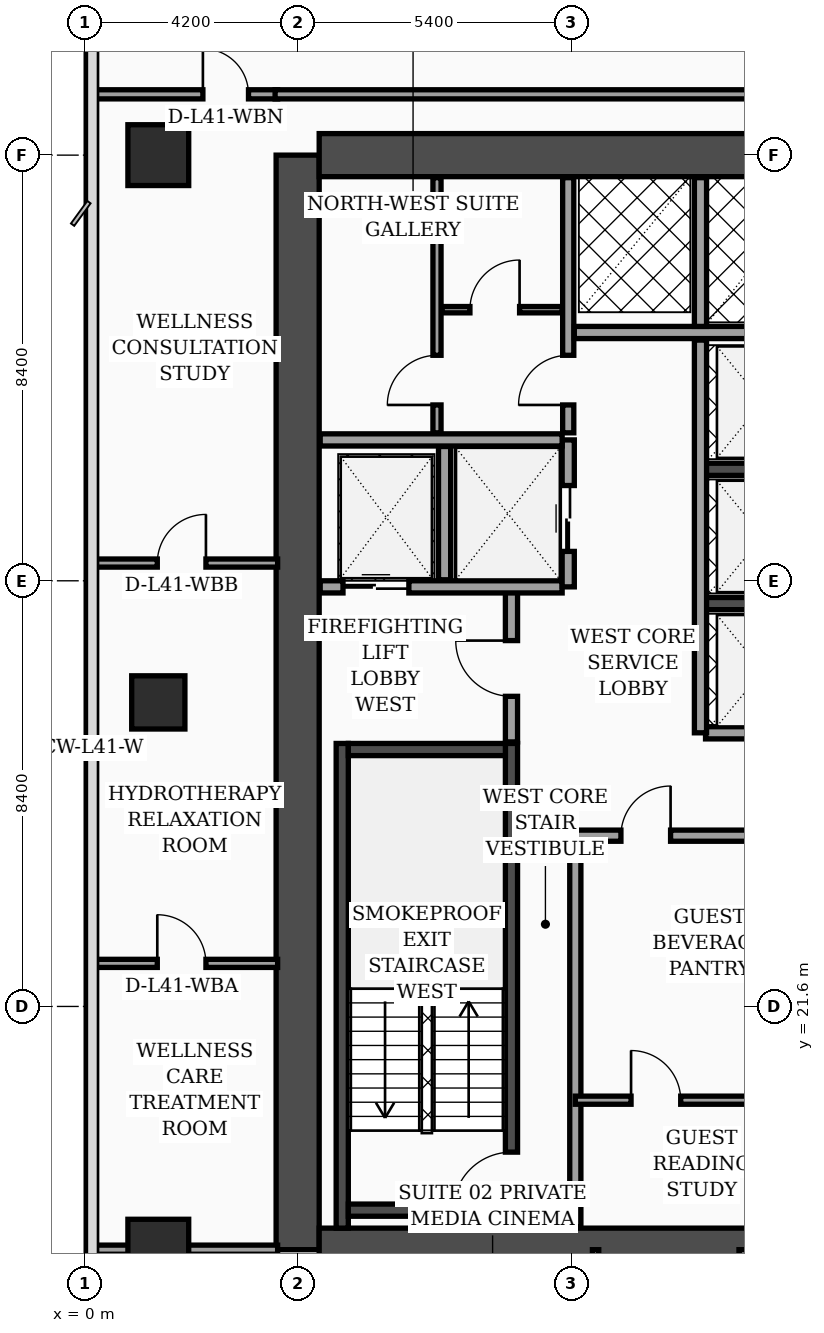
"""IFC4 building model, lengths in metres.
Left out: names, types, materials, properties, quantities, classifications, styles, units other than length and angle.
Written with IfcOpenShell. Run it as: python <this file> out.ifc"""

import sys

from ifc_helpers import new_model, si_unit, direction, frame, frame_2d, origin, origin_2d, place, context, subcontext, project, spatial, rectangle, extrude, element, fill, save


model = new_model("IFC4")
c1 = context("Model", 3, precision=1e-05, world=origin(), true_north=direction((0.0, 1.0)))
c2 = subcontext(c1, "Body", "Model", "MODEL_VIEW")
j1 = project(units=[si_unit("LENGTHUNIT", "METRE"), si_unit("PLANEANGLEUNIT", "RADIAN")], contexts=[c1])
p1 = place(None, origin())
s1 = spatial("IfcSite", under=j1, at=p1, CompositionType="ELEMENT")
p2 = place(p1, origin())
s2 = spatial("IfcBuilding", under=s1, at=p2, CompositionType="ELEMENT")
p3 = place(p2, frame((0.0, 0.0, 167.5)))
s3 = spatial("IfcBuildingStorey", under=s2, at=p3, CompositionType="ELEMENT", Elevation=167.5)
p4 = place(p3, frame((4.2, 16.8, 0.0), z_axis=(0.0, 0.0, 1.0), x_axis=(0.0, 1.0, 0.0)))
e1 = element("IfcWall", 1, at=p4, inside=s3, PredefinedType="SHEAR", context=c2, shape_type="SweptSolid", body=[
    extrude(rectangle(XDim=21.6, YDim=0.85, at=frame_2d((10.8, 0.0))), origin(), (0.0, 0.0, 1.0), 3.56),
])
for number, where, z_axis, x_axis in (
    (2, (4.625, 38.4, 0.0), (0.0, 0.0, 1.0), (1.0, 0.0, 0.0)),
    (3, (4.625, 16.8, 0.0), (0.0, 0.0, 1.0), (1.0, 0.0, 0.0)),
):
    element("IfcWall", number, at=place(p3, frame(where, z_axis=z_axis, x_axis=x_axis)), inside=s3, PredefinedType="SHEAR", context=c2, shape_type="SweptSolid", body=[
        extrude(rectangle(XDim=9.95, YDim=0.85, at=frame_2d((4.975, 0.0))), origin(), (0.0, 0.0, 1.0), 3.56),
    ])
p5 = place(p3, frame((5.08, 17.225, 0.0), z_axis=(0.0, 0.0, 1.0), x_axis=(0.0, 1.0, 0.0)))
e4 = element("IfcWall", 4, at=p5, inside=s3, PredefinedType="SOLIDWALL", context=c2, shape_type="SweptSolid", body=[
    extrude(rectangle(XDim=9.565, YDim=0.24, at=frame_2d((4.782, 0.0))), origin(), (0.0, 0.0, 1.0), 3.56),
])
p6 = place(p3, frame((8.42, 17.225, 0.0), z_axis=(0.0, 0.0, 1.0), x_axis=(0.0, 1.0, 0.0)))
e5 = element("IfcWall", 5, at=p6, inside=s3, PredefinedType="SOLIDWALL", context=c2, shape_type="SweptSolid", body=[
    extrude(rectangle(XDim=9.565, YDim=0.24, at=frame_2d((4.782, 0.0))), origin(), (0.0, 0.0, 1.0), 3.56),
])
p7 = place(p6, frame((0.35, 0.0, 0.0)))
e6 = element("IfcOpeningElement", 6, at=p7, cuts=e5, PredefinedType="OPENING", context=c2, shape_type="SweptSolid", body=[
    extrude(rectangle(XDim=1.15, YDim=2.2, at=frame_2d((0.575, 1.1))), frame((0.0, 0.13, 0.0), z_axis=(0.0, -1.0, 0.0), x_axis=(1.0, 0.0, 0.0)), (0.0, 0.0, 1.0), 0.26),
])
for number, where, z_axis, x_axis in (
    (7, (5.2, 17.58, 0.0), (0.0, 0.0, 1.0), (1.0, 0.0, 0.0)),
    (8, (5.2, 26.67, 0.0), (0.0, 0.0, 1.0), (1.0, 0.0, 0.0)),
):
    element("IfcWall", number, at=place(p3, frame(where, z_axis=z_axis, x_axis=x_axis)), inside=s3, PredefinedType="SOLIDWALL", context=c2, shape_type="SweptSolid", body=[
        extrude(rectangle(XDim=3.1, YDim=0.24, at=frame_2d((1.55, 0.0))), origin(), (0.0, 0.0, 1.0), 3.56),
    ])
for number, where, z_axis, x_axis in (
    (9, (12.18, 29.55, 0.0), (0.0, 0.0, 1.0), (1.0, 0.0, 0.0)),
    (10, (12.18, 32.2, 0.0), (0.0, 0.0, 1.0), (1.0, 0.0, 0.0)),
):
    element("IfcWall", number, at=place(p3, frame(where, z_axis=z_axis, x_axis=x_axis)), inside=s3, PredefinedType="SOLIDWALL", context=c2, shape_type="SweptSolid", body=[
        extrude(rectangle(XDim=2.395, YDim=0.24, at=frame_2d((1.198, 0.0))), origin(), (0.0, 0.0, 1.0), 3.56),
    ])
p8 = place(p3, frame((1.45, 16.8, 0.0), z_axis=(0.0, 0.0, 1.0), x_axis=(1.0, 0.0, 0.0)))
e11 = element("IfcColumn", 11, at=p8, inside=s3, PredefinedType="COLUMN", context=c2, shape_type="SweptSolid", body=[
    extrude(rectangle(XDim=1.2, YDim=1.2, at=origin_2d()), origin(), (0.0, 0.0, 1.0), 3.56),
])
p9 = place(p3, frame((1.45, 27.6, 0.0), z_axis=(0.0, 0.0, 1.0), x_axis=(1.0, 0.0, 0.0)))
e12 = element("IfcColumn", 12, at=p9, inside=s3, PredefinedType="COLUMN", context=c2, shape_type="SweptSolid", body=[
    extrude(rectangle(XDim=1.05, YDim=1.05, at=origin_2d()), origin(), (0.0, 0.0, 1.0), 3.56),
])
p10 = place(p3, frame((1.45, 38.4, 0.0), z_axis=(0.0, 0.0, 1.0), x_axis=(1.0, 0.0, 0.0)))
e13 = element("IfcColumn", 13, at=p10, inside=s3, PredefinedType="COLUMN", context=c2, shape_type="SweptSolid", body=[
    extrude(rectangle(XDim=1.2, YDim=1.2, at=origin_2d()), origin(), (0.0, 0.0, 1.0), 3.56),
])
p11 = place(p3, frame((8.42, 26.82, 0.0), z_axis=(0.0, 0.0, 1.0), x_axis=(0.0, 1.0, 0.0)))
e14 = element("IfcWall", 14, at=p11, inside=s3, PredefinedType="SOLIDWALL", context=c2, shape_type="SweptSolid", body=[
    extrude(rectangle(XDim=3.0, YDim=0.24, at=frame_2d((1.5, 0.0))), origin(), (0.0, 0.0, 1.0), 3.56),
])
p12 = place(p11, frame((0.9, 0.0, 0.0)))
e15 = element("IfcOpeningElement", 15, at=p12, cuts=e14, PredefinedType="OPENING", context=c2, shape_type="SweptSolid", body=[
    extrude(rectangle(XDim=1.1, YDim=2.2, at=frame_2d((0.55, 1.1))), frame((0.0, 0.13, 0.0), z_axis=(0.0, -1.0, 0.0), x_axis=(1.0, 0.0, 0.0)), (0.0, 0.0, 1.0), 0.26),
])
p13 = place(p3, frame((4.645, 29.88, 0.0), z_axis=(0.0, 0.0, 1.0), x_axis=(1.0, 0.0, 0.0)))
e16 = element("IfcWall", 16, at=p13, inside=s3, PredefinedType="SOLIDWALL", context=c2, shape_type="SweptSolid", body=[
    extrude(rectangle(XDim=4.775, YDim=0.24, at=frame_2d((2.387, 0.0))), origin(), (0.0, 0.0, 1.0), 3.56),
])
p14 = place(p13, frame((0.45, 0.0, 0.0)))
e17 = element("IfcOpeningElement", 17, at=p14, cuts=e16, PredefinedType="OPENING", context=c2, shape_type="SweptSolid", body=[
    extrude(rectangle(XDim=1.3, YDim=2.35, at=frame_2d((0.65, 1.175))), frame((0.0, 0.13, 0.0), z_axis=(0.0, -1.0, 0.0), x_axis=(1.0, 0.0, 0.0)), (0.0, 0.0, 1.0), 0.26),
])
p15 = place(p3, frame((7.1, 30.02, 0.0), z_axis=(0.0, 0.0, 1.0), x_axis=(0.0, 1.0, 0.0)))
e18 = element("IfcWall", 18, at=p15, inside=s3, PredefinedType="SOLIDWALL", context=c2, shape_type="SweptSolid", body=[
    extrude(rectangle(XDim=2.63, YDim=0.24, at=frame_2d((1.315, 0.0))), origin(), (0.0, 0.0, 1.0), 3.56),
])
p16 = place(p3, frame((9.54, 29.88, 0.0), z_axis=(0.0, 0.0, 1.0), x_axis=(0.0, 1.0, 0.0)))
e19 = element("IfcWall", 19, at=p16, inside=s3, PredefinedType="SOLIDWALL", context=c2, shape_type="SweptSolid", body=[
    extrude(rectangle(XDim=2.9, YDim=0.24, at=frame_2d((1.45, 0.0))), origin(), (0.0, 0.0, 1.0), 3.56),
])
p17 = place(p16, frame((0.7, 0.0, 0.0)))
e20 = element("IfcOpeningElement", 20, at=p17, cuts=e19, PredefinedType="OPENING", context=c2, shape_type="SweptSolid", body=[
    extrude(rectangle(XDim=1.3, YDim=2.35, at=frame_2d((0.65, 1.175))), frame((0.0, 0.13, 0.0), z_axis=(0.0, -1.0, 0.0), x_axis=(1.0, 0.0, 0.0)), (0.0, 0.0, 1.0), 0.26),
])
p18 = place(p3, frame((4.645, 32.78, 0.0), z_axis=(0.0, 0.0, 1.0), x_axis=(1.0, 0.0, 0.0)))
e21 = element("IfcWall", 21, at=p18, inside=s3, PredefinedType="SOLIDWALL", context=c2, shape_type="SweptSolid", body=[
    extrude(rectangle(XDim=4.775, YDim=0.24, at=frame_2d((2.387, 0.0))), origin(), (0.0, 0.0, 1.0), 3.19),
])
p19 = place(p3, frame((9.68, 17.245, 0.0), z_axis=(0.0, 0.0, 1.0), x_axis=(0.0, 1.0, 0.0)))
e22 = element("IfcWall", 22, at=p19, inside=s3, PredefinedType="SOLIDWALL", context=c2, shape_type="SweptSolid", body=[
    extrude(rectangle(XDim=7.755, YDim=0.22, at=frame_2d((3.877, 0.0))), origin(), (0.0, 0.0, 1.0), 3.56),
])
p20 = place(p3, frame((6.95, 32.92, 0.0), z_axis=(0.0, 0.0, 1.0), x_axis=(0.0, 1.0, 0.0)))
e23 = element("IfcWall", 23, at=p20, inside=s3, PredefinedType="PARTITIONING", context=c2, shape_type="SweptSolid", body=[
    extrude(rectangle(XDim=5.035, YDim=0.16, at=frame_2d((2.518, 0.0))), origin(), (0.0, 0.0, 1.0), 3.56),
])
p21 = place(p20, frame((0.55, 0.0, 0.0)))
e24 = element("IfcOpeningElement", 24, at=p21, cuts=e23, PredefinedType="OPENING", context=c2, shape_type="SweptSolid", body=[
    extrude(rectangle(XDim=0.98, YDim=2.15, at=frame_2d((0.49, 1.075))), frame((0.0, 0.09, 0.0), z_axis=(0.0, -1.0, 0.0), x_axis=(1.0, 0.0, 0.0)), (0.0, 0.0, 1.0), 0.18),
])
p22 = place(p3, frame((7.05, 35.35, 0.0), z_axis=(0.0, 0.0, 1.0), x_axis=(1.0, 0.0, 0.0)))
e25 = element("IfcWall", 25, at=p22, inside=s3, PredefinedType="PARTITIONING", context=c2, shape_type="SweptSolid", body=[
    extrude(rectangle(XDim=2.37, YDim=0.125, at=frame_2d((1.185, 0.0))), origin(), (0.0, 0.0, 1.0), 3.56),
])
p23 = place(p22, frame((0.55, 0.0, 0.0)))
e26 = element("IfcOpeningElement", 26, at=p23, cuts=e25, PredefinedType="OPENING", context=c2, shape_type="SweptSolid", body=[
    extrude(rectangle(XDim=0.98, YDim=2.15, at=frame_2d((0.49, 1.075))), frame((0.0, 0.073, 0.0), z_axis=(0.0, -1.0, 0.0), x_axis=(1.0, 0.0, 0.0)), (0.0, 0.0, 1.0), 0.145),
])
p24 = place(p3, frame((9.54, 32.92, 0.0), z_axis=(0.0, 0.0, 1.0), x_axis=(0.0, 1.0, 0.0)))
e27 = element("IfcWall", 27, at=p24, inside=s3, PredefinedType="SOLIDWALL", context=c2, shape_type="SweptSolid", body=[
    extrude(rectangle(XDim=5.035, YDim=0.22, at=frame_2d((2.518, 0.0))), origin(), (0.0, 0.0, 1.0), 3.56),
])
p25 = place(p24, frame((0.55, 0.0, 0.0)))
e28 = element("IfcOpeningElement", 28, at=p25, cuts=e27, PredefinedType="OPENING", context=c2, shape_type="SweptSolid", body=[
    extrude(rectangle(XDim=0.98, YDim=2.15, at=frame_2d((0.49, 1.075))), frame((0.0, 0.12, 0.0), z_axis=(0.0, -1.0, 0.0), x_axis=(1.0, 0.0, 0.0)), (0.0, 0.0, 1.0), 0.24),
])
p26 = place(p3, frame((9.68, 19.75, 0.0), z_axis=(0.0, 0.0, 1.0), x_axis=(1.0, 0.0, 0.0)))
e29 = element("IfcWall", 29, at=p26, inside=s3, PredefinedType="PARTITIONING", context=c2, shape_type="SweptSolid", body=[
    extrude(rectangle(XDim=4.875, YDim=0.16, at=frame_2d((2.438, 0.0))), origin(), (0.0, 0.0, 1.0), 3.56),
])
p27 = place(p26, frame((1.1, 0.0, 0.0)))
e30 = element("IfcOpeningElement", 30, at=p27, cuts=e29, PredefinedType="OPENING", context=c2, shape_type="SweptSolid", body=[
    extrude(rectangle(XDim=0.98, YDim=2.15, at=frame_2d((0.49, 1.075))), frame((0.0, 0.09, 0.0), z_axis=(0.0, -1.0, 0.0), x_axis=(1.0, 0.0, 0.0)), (0.0, 0.0, 1.0), 0.18),
])
p28 = place(p3, frame((9.68, 24.97, 0.0), z_axis=(0.0, 0.0, 1.0), x_axis=(1.0, 0.0, 0.0)))
e31 = element("IfcWall", 31, at=p28, inside=s3, PredefinedType="SOLIDWALL", context=c2, shape_type="SweptSolid", body=[
    extrude(rectangle(XDim=4.875, YDim=0.22, at=frame_2d((2.438, 0.0))), origin(), (0.0, 0.0, 1.0), 2.94),
])
p29 = place(p28, frame((0.9, 0.0, 0.0)))
e32 = element("IfcOpeningElement", 32, at=p29, cuts=e31, PredefinedType="OPENING", context=c2, shape_type="SweptSolid", body=[
    extrude(rectangle(XDim=0.98, YDim=2.15, at=frame_2d((0.49, 1.075))), frame((0.0, 0.12, 0.0), z_axis=(0.0, -1.0, 0.0), x_axis=(1.0, 0.0, 0.0)), (0.0, 0.0, 1.0), 0.24),
])
p30 = place(p3, frame((12.25, 27.0, 0.0), z_axis=(0.0, 0.0, 1.0), x_axis=(1.0, 0.0, 0.0)))
e33 = element("IfcWall", 33, at=p30, inside=s3, PredefinedType="SOLIDWALL", context=c2, shape_type="SweptSolid", body=[
    extrude(rectangle(XDim=2.305, YDim=0.24, at=frame_2d((1.152, 0.0))), origin(), (0.0, 0.0, 1.0), 3.56),
])
p31 = place(p3, frame((12.15, 27.0, 0.0), z_axis=(0.0, 0.0, 1.0), x_axis=(0.0, 1.0, 0.0)))
e34 = element("IfcWall", 34, at=p31, inside=s3, PredefinedType="SOLIDWALL", context=c2, shape_type="SweptSolid", body=[
    extrude(rectangle(XDim=7.75, YDim=0.24, at=frame_2d((3.875, 0.0))), origin(), (0.0, 0.0, 1.0), 3.56),
])
p32 = place(p3, frame((9.66, 34.9, 0.0), z_axis=(0.0, 0.0, 1.0), x_axis=(1.0, 0.0, 0.0)))
e35 = element("IfcWall", 35, at=p32, inside=s3, PredefinedType="SOLIDWALL", context=c2, shape_type="SweptSolid", body=[
    extrude(rectangle(XDim=4.895, YDim=0.24, at=frame_2d((2.448, 0.0))), origin(), (0.0, 0.0, 1.0), 3.56),
])
p33 = place(p3, frame((12.15, 35.02, 0.0), z_axis=(0.0, 0.0, 1.0), x_axis=(0.0, 1.0, 0.0)))
e36 = element("IfcWall", 36, at=p33, inside=s3, PredefinedType="SOLIDWALL", context=c2, shape_type="SweptSolid", body=[
    extrude(rectangle(XDim=2.935, YDim=0.24, at=frame_2d((1.468, 0.0))), origin(), (0.0, 0.0, 1.0), 3.56),
])
p34 = place(p3, frame((0.08, 22.45, 0.0), z_axis=(0.0, 0.0, 1.0), x_axis=(1.0, 0.0, 0.0)))
e37 = element("IfcWall", 37, at=p34, inside=s3, PredefinedType="PARTITIONING", context=c2, shape_type="SweptSolid", body=[
    extrude(rectangle(XDim=3.725, YDim=0.16, at=frame_2d((1.862, 0.0))), origin(), (0.0, 0.0, 1.0), 3.04),
])
p35 = place(p34, frame((1.35, 0.0, 0.0)))
e38 = element("IfcOpeningElement", 38, at=p35, cuts=e37, PredefinedType="OPENING", context=c2, shape_type="SweptSolid", body=[
    extrude(rectangle(XDim=0.96, YDim=2.2, at=frame_2d((0.48, 1.1))), frame((0.0, 0.09, 0.0), z_axis=(0.0, -1.0, 0.0), x_axis=(1.0, 0.0, 0.0)), (0.0, 0.0, 1.0), 0.18),
])
p36 = place(p3, frame((0.08, 30.35, 0.0), z_axis=(0.0, 0.0, 1.0), x_axis=(1.0, 0.0, 0.0)))
e39 = element("IfcWall", 39, at=p36, inside=s3, PredefinedType="PARTITIONING", context=c2, shape_type="SweptSolid", body=[
    extrude(rectangle(XDim=3.725, YDim=0.16, at=frame_2d((1.862, 0.0))), origin(), (0.0, 0.0, 1.0), 3.04),
])
p37 = place(p36, frame((1.35, 0.0, 0.0)))
e40 = element("IfcOpeningElement", 40, at=p37, cuts=e39, PredefinedType="OPENING", context=c2, shape_type="SweptSolid", body=[
    extrude(rectangle(XDim=0.96, YDim=2.2, at=frame_2d((0.48, 1.1))), frame((0.0, 0.09, 0.0), z_axis=(0.0, -1.0, 0.0), x_axis=(1.0, 0.0, 0.0)), (0.0, 0.0, 1.0), 0.18),
])
p38 = place(p3, frame((0.08, 16.8, 0.0), z_axis=(0.0, 0.0, 1.0), x_axis=(1.0, 0.0, 0.0)))
e41 = element("IfcWall", 41, at=p38, inside=s3, PredefinedType="PARTITIONING", context=c2, shape_type="SweptSolid", body=[
    extrude(rectangle(XDim=3.725, YDim=0.18, at=frame_2d((1.862, 0.0))), origin(), (0.0, 0.0, 1.0), 2.94),
])
p39 = place(p3, frame((0.08, 39.6, 0.0), z_axis=(0.0, 0.0, 1.0), x_axis=(1.0, 0.0, 0.0)))
e42 = element("IfcWall", 42, at=p39, inside=s3, PredefinedType="PARTITIONING", context=c2, shape_type="SweptSolid", body=[
    extrude(rectangle(XDim=3.725, YDim=0.18, at=frame_2d((1.862, 0.0))), origin(), (0.0, 0.0, 1.0), 2.94),
])
p40 = place(p39, frame((2.25, 0.0, 0.0)))
e43 = element("IfcOpeningElement", 43, at=p40, cuts=e42, PredefinedType="OPENING", context=c2, shape_type="SweptSolid", body=[
    extrude(rectangle(XDim=0.9, YDim=2.15, at=frame_2d((0.45, 1.075))), frame((0.0, 0.1, 0.0), z_axis=(0.0, -1.0, 0.0), x_axis=(1.0, 0.0, 0.0)), (0.0, 0.0, 1.0), 0.2),
])
p41 = place(p3, frame((10.08, 14.75, 0.0), z_axis=(0.0, 0.0, 1.0), x_axis=(0.0, 1.0, 0.0)))
e44 = element("IfcWall", 44, at=p41, inside=s3, PredefinedType="PARTITIONING", context=c2, shape_type="SweptSolid", body=[
    extrude(rectangle(XDim=2.05, YDim=0.125, at=frame_2d((1.025, 0.0))), origin(), (0.0, 0.0, 1.0), 3.56),
])
p42 = place(p3, frame((13.0, 2.44, 0.0), z_axis=(0.0, 0.0, 1.0), x_axis=(0.0, 1.0, 0.0)))
e45 = element("IfcWall", 45, at=p42, inside=s3, PredefinedType="PARTITIONING", context=c2, shape_type="SweptSolid", body=[
    extrude(rectangle(XDim=14.36, YDim=0.18, at=frame_2d((7.18, 0.0))), origin(), (0.0, 0.0, 1.0), 2.94),
])
p43 = place(p42, frame((3.01, 0.0, 0.0)))
e46 = element("IfcOpeningElement", 46, at=p43, cuts=e45, PredefinedType="OPENING", context=c2, shape_type="SweptSolid", body=[
    extrude(rectangle(XDim=1.02, YDim=2.2, at=frame_2d((0.51, 1.1))), frame((0.0, 0.1, 0.0), z_axis=(0.0, -1.0, 0.0), x_axis=(1.0, 0.0, 0.0)), (0.0, 0.0, 1.0), 0.2),
])
p44 = place(p42, frame((10.1, 0.0, 0.0)))
e47 = element("IfcOpeningElement", 47, at=p44, cuts=e45, PredefinedType="OPENING", context=c2, shape_type="SweptSolid", body=[
    extrude(rectangle(XDim=1.02, YDim=2.2, at=frame_2d((0.51, 1.1))), frame((0.0, 0.1, 0.0), z_axis=(0.0, -1.0, 0.0), x_axis=(1.0, 0.0, 0.0)), (0.0, 0.0, 1.0), 0.2),
])
p45 = place(p3, frame((3.755, 39.6, 0.0), z_axis=(0.0, 0.0, 1.0), x_axis=(1.0, 0.0, 0.0)))
e48 = element("IfcWall", 48, at=p45, inside=s3, PredefinedType="PARTITIONING", context=c2, shape_type="SweptSolid", body=[
    extrude(rectangle(XDim=11.395, YDim=0.18, at=frame_2d((5.698, 0.0))), origin(), (0.0, 0.0, 1.0), 2.94),
])
p46 = place(p12, origin())
e49 = element("IfcDoor", 49, at=p46, inside=s3, OperationType="SINGLE_SWING_RIGHT", PredefinedType="DOOR", context=c2, shape_type="SweptSolid", body=[
    extrude(rectangle(XDim=1.1, YDim=2.2, at=frame_2d((0.55, 1.1))), frame((0.0, 0.025, 0.0), z_axis=(0.0, -1.0, 0.0), x_axis=(1.0, 0.0, 0.0)), (0.0, 0.0, 1.0), 0.05),
])
fill(e15, e49)
p47 = place(p14, origin())
e50 = element("IfcDoor", 50, at=p47, inside=s3, OperationType="DOUBLE_DOOR_SLIDING", PredefinedType="DOOR", context=c2, shape_type="SweptSolid", body=[
    extrude(rectangle(XDim=1.3, YDim=2.35, at=frame_2d((0.65, 1.175))), frame((0.0, 0.025, 0.0), z_axis=(0.0, -1.0, 0.0), x_axis=(1.0, 0.0, 0.0)), (0.0, 0.0, 1.0), 0.05),
])
fill(e17, e50)
p48 = place(p17, origin())
e51 = element("IfcDoor", 51, at=p48, inside=s3, OperationType="DOUBLE_DOOR_SLIDING", PredefinedType="DOOR", context=c2, shape_type="SweptSolid", body=[
    extrude(rectangle(XDim=1.3, YDim=2.35, at=frame_2d((0.65, 1.175))), frame((0.0, 0.025, 0.0), z_axis=(0.0, -1.0, 0.0), x_axis=(1.0, 0.0, 0.0)), (0.0, 0.0, 1.0), 0.05),
])
fill(e20, e51)
p49 = place(p21, origin())
e52 = element("IfcDoor", 52, at=p49, inside=s3, OperationType="SINGLE_SWING_LEFT", PredefinedType="DOOR", context=c2, shape_type="SweptSolid", body=[
    extrude(rectangle(XDim=0.98, YDim=2.15, at=frame_2d((0.49, 1.075))), frame((0.0, 0.025, 0.0), z_axis=(0.0, -1.0, 0.0), x_axis=(1.0, 0.0, 0.0)), (0.0, 0.0, 1.0), 0.05),
])
fill(e24, e52)
p50 = place(p23, origin())
e53 = element("IfcDoor", 53, at=p50, inside=s3, OperationType="SINGLE_SWING_RIGHT", PredefinedType="DOOR", context=c2, shape_type="SweptSolid", body=[
    extrude(rectangle(XDim=0.98, YDim=2.15, at=frame_2d((0.49, 1.075))), frame((0.0, 0.025, 0.0), z_axis=(0.0, -1.0, 0.0), x_axis=(1.0, 0.0, 0.0)), (0.0, 0.0, 1.0), 0.05),
])
fill(e26, e53)
p51 = place(p25, origin())
e54 = element("IfcDoor", 54, at=p51, inside=s3, OperationType="SINGLE_SWING_LEFT", PredefinedType="DOOR", context=c2, shape_type="SweptSolid", body=[
    extrude(rectangle(XDim=0.98, YDim=2.15, at=frame_2d((0.49, 1.075))), frame((0.0, 0.025, 0.0), z_axis=(0.0, -1.0, 0.0), x_axis=(1.0, 0.0, 0.0)), (0.0, 0.0, 1.0), 0.05),
])
fill(e28, e54)
p52 = place(p27, origin())
e55 = element("IfcDoor", 55, at=p52, inside=s3, OperationType="SINGLE_SWING_LEFT", PredefinedType="DOOR", context=c2, shape_type="SweptSolid", body=[
    extrude(rectangle(XDim=0.98, YDim=2.15, at=frame_2d((0.49, 1.075))), frame((0.0, 0.025, 0.0), z_axis=(0.0, -1.0, 0.0), x_axis=(1.0, 0.0, 0.0)), (0.0, 0.0, 1.0), 0.05),
])
fill(e30, e55)
p53 = place(p29, origin())
e56 = element("IfcDoor", 56, at=p53, inside=s3, OperationType="SINGLE_SWING_RIGHT", PredefinedType="DOOR", context=c2, shape_type="SweptSolid", body=[
    extrude(rectangle(XDim=0.98, YDim=2.15, at=frame_2d((0.49, 1.075))), frame((0.0, 0.025, 0.0), z_axis=(0.0, -1.0, 0.0), x_axis=(1.0, 0.0, 0.0)), (0.0, 0.0, 1.0), 0.05),
])
fill(e32, e56)
p54 = place(p35, origin())
e57 = element("IfcDoor", 57, at=p54, inside=s3, OperationType="SINGLE_SWING_LEFT", PredefinedType="DOOR", context=c2, shape_type="SweptSolid", body=[
    extrude(rectangle(XDim=0.96, YDim=2.2, at=frame_2d((0.48, 1.1))), frame((0.0, 0.025, 0.0), z_axis=(0.0, -1.0, 0.0), x_axis=(1.0, 0.0, 0.0)), (0.0, 0.0, 1.0), 0.05),
])
fill(e38, e57)
p55 = place(p37, origin())
e58 = element("IfcDoor", 58, at=p55, inside=s3, OperationType="SINGLE_SWING_RIGHT", PredefinedType="DOOR", context=c2, shape_type="SweptSolid", body=[
    extrude(rectangle(XDim=0.96, YDim=2.2, at=frame_2d((0.48, 1.1))), frame((0.0, 0.025, 0.0), z_axis=(0.0, -1.0, 0.0), x_axis=(1.0, 0.0, 0.0)), (0.0, 0.0, 1.0), 0.05),
])
fill(e40, e58)
p56 = place(p40, origin())
e59 = element("IfcDoor", 59, at=p56, inside=s3, OperationType="SINGLE_SWING_LEFT", PredefinedType="DOOR", context=c2, shape_type="SweptSolid", body=[
    extrude(rectangle(XDim=0.9, YDim=2.15, at=frame_2d((0.45, 1.075))), frame((0.0, 0.025, 0.0), z_axis=(0.0, -1.0, 0.0), x_axis=(1.0, 0.0, 0.0)), (0.0, 0.0, 1.0), 0.05),
])
fill(e43, e59)
p57 = place(p7, origin())
e60 = element("IfcDoor", 60, at=p57, inside=s3, OperationType="SINGLE_SWING_LEFT", PredefinedType="DOOR", context=c2, shape_type="SweptSolid", body=[
    extrude(rectangle(XDim=1.15, YDim=2.2, at=frame_2d((0.575, 1.1))), frame((0.0, 0.025, 0.0), z_axis=(0.0, -1.0, 0.0), x_axis=(1.0, 0.0, 0.0)), (0.0, 0.0, 1.0), 0.05),
])
fill(e6, e60)
save(model, sys.argv[1])
